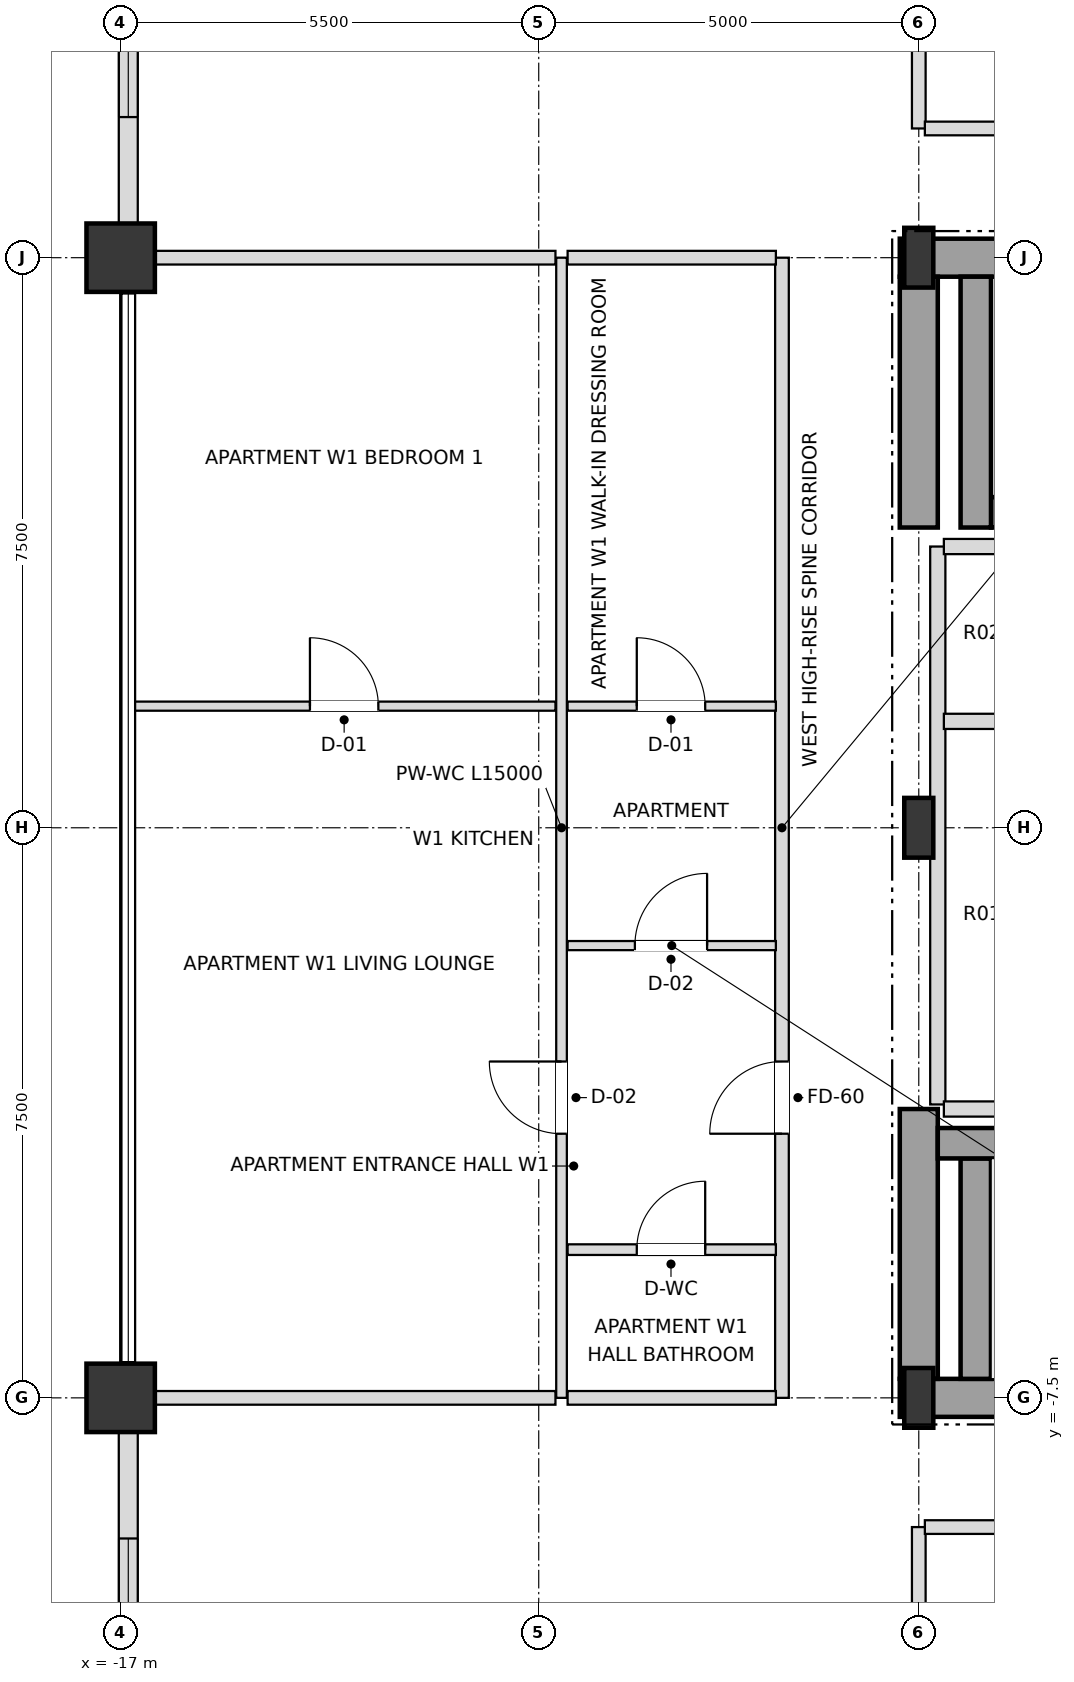
"""IFC4 building model, lengths in metres.
Left out: names, types, materials, properties, quantities, classifications, styles, units other than length and angle.
Written with IfcOpenShell. Run it as: python <this file> out.ifc"""

import sys

from ifc_helpers import new_model, si_unit, direction, frame, frame_2d, origin, origin_2d, place, context, subcontext, project, spatial, rectangle, i_section, extrude, element, fill, save


model = new_model("IFC4")
c1 = context("Model", 3, precision=1e-05, world=origin(), true_north=direction((0.0, 1.0)))
c2 = subcontext(c1, "Body", "Model", "MODEL_VIEW")
j1 = project(units=[si_unit("LENGTHUNIT", "METRE"), si_unit("PLANEANGLEUNIT", "RADIAN")], contexts=[c1])
p1 = place(None, origin())
s1 = spatial("IfcSite", under=j1, at=p1, CompositionType="ELEMENT")
p2 = place(p1, origin())
s2 = spatial("IfcBuilding", under=s1, at=p2, CompositionType="ELEMENT")
p3 = place(p2, frame((0.0, 0.0, 290.7)))
s3 = spatial("IfcBuildingStorey", under=s2, at=p3, CompositionType="ELEMENT", Elevation=290.7)
for number, where, z_axis, x_axis in (
    (1, (-6.5, -7.5, 0.0), (0.0, 0.0, 1.0), (1.0, 0.0, 0.0)),
    (2, (-6.5, 0.0, 0.0), (0.0, 0.0, 1.0), (1.0, 0.0, 0.0)),
    (3, (-6.5, 7.5, 0.0), (0.0, 0.0, 1.0), (1.0, 0.0, 0.0)),
):
    element("IfcColumn", number, at=place(p3, frame(where, z_axis=z_axis, x_axis=x_axis)), inside=s3, PredefinedType="COLUMN", context=c2, shape_type="SweptSolid", body=[
        extrude(i_section(OverallWidth=0.382, OverallDepth=0.786, WebThickness=0.02, FlangeThickness=0.033, at=origin_2d()), origin(), (0.0, 0.0, 1.0), 3.6),
    ])
for number, where, z_axis, x_axis in (
    (4, (-17.0, 7.5, 0.0), (0.0, 0.0, 1.0), (1.0, 0.0, 0.0)),
    (5, (-17.0, -7.5, 0.0), (0.0, 0.0, 1.0), (1.0, 0.0, 0.0)),
):
    element("IfcColumn", number, at=place(p3, frame(where, z_axis=z_axis, x_axis=x_axis)), inside=s3, PredefinedType="USERDEFINED", context=c2, shape_type="SweptSolid", body=[
        extrude(rectangle(XDim=0.9, YDim=0.9, at=origin_2d()), origin(), (0.0, 0.0, 1.0), 3.6),
    ])
p4 = place(p3, frame((-16.9, 12.555, 0.0), z_axis=(0.0, 0.0, 1.0), x_axis=(0.0, -1.0, 0.0)))
e6 = element("IfcWall", 6, at=p4, inside=s3, PredefinedType="SOLIDWALL", context=c2, shape_type="SweptSolid", body=[
    extrude(rectangle(XDim=4.61, YDim=0.25, at=frame_2d((2.305, 0.0))), origin(), (0.0, 0.0, 1.0), 2.748),
])
p5 = place(p4, frame((1.405, 0.0, 0.72)))
e7 = element("IfcOpeningElement", 7, at=p5, cuts=e6, PredefinedType="OPENING", context=c2, shape_type="SweptSolid", body=[
    extrude(rectangle(XDim=1.8, YDim=1.68, at=frame_2d((0.9, 0.84))), frame((0.0, 0.135, 0.0), z_axis=(0.0, -1.0, 0.0), x_axis=(1.0, 0.0, 0.0)), (0.0, 0.0, 1.0), 0.27),
])
p6 = place(p3, frame((-16.9, -7.945, 0.0), z_axis=(0.0, 0.0, 1.0), x_axis=(0.0, -1.0, 0.0)))
e8 = element("IfcWall", 8, at=p6, inside=s3, PredefinedType="SOLIDWALL", context=c2, shape_type="SweptSolid", body=[
    extrude(rectangle(XDim=4.61, YDim=0.25, at=frame_2d((2.305, 0.0))), origin(), (0.0, 0.0, 1.0), 2.748),
])
p7 = place(p6, frame((1.405, 0.0, 0.72)))
e9 = element("IfcOpeningElement", 9, at=p7, cuts=e8, PredefinedType="OPENING", context=c2, shape_type="SweptSolid", body=[
    extrude(rectangle(XDim=1.8, YDim=1.68, at=frame_2d((0.9, 0.84))), frame((0.0, 0.135, 0.0), z_axis=(0.0, -1.0, 0.0), x_axis=(1.0, 0.0, 0.0)), (0.0, 0.0, 1.0), 0.27),
])
p8 = place(p3, frame((-6.75, -7.5, 0.0), z_axis=(0.0, 0.0, 1.0), x_axis=(1.0, 0.0, 0.0)))
e10 = element("IfcWall", 10, at=p8, inside=s3, PredefinedType="SHEAR", context=c2, shape_type="SweptSolid", body=[
    extrude(rectangle(XDim=6.75, YDim=0.5, at=frame_2d((3.375, 0.0))), origin(), (0.0, 0.0, 1.0), 3.38),
])
p9 = place(p3, frame((-6.75, 7.5, 0.0), z_axis=(0.0, 0.0, 1.0), x_axis=(1.0, 0.0, 0.0)))
e11 = element("IfcWall", 11, at=p9, inside=s3, PredefinedType="SHEAR", context=c2, shape_type="SweptSolid", body=[
    extrude(rectangle(XDim=6.75, YDim=0.5, at=frame_2d((3.375, 0.0))), origin(), (0.0, 0.0, 1.0), 3.38),
])
p10 = place(p9, frame((1.65, 0.0, 0.0)))
e12 = element("IfcOpeningElement", 12, at=p10, cuts=e11, PredefinedType="OPENING", context=c2, shape_type="SweptSolid", body=[
    extrude(rectangle(XDim=1.05, YDim=2.15, at=frame_2d((0.525, 1.075))), frame((0.0, 0.26, 0.0), z_axis=(0.0, -1.0, 0.0), x_axis=(1.0, 0.0, 0.0)), (0.0, 0.0, 1.0), 0.52),
])
p11 = place(p3, frame((-6.5, -7.25, 0.0), z_axis=(0.0, 0.0, 1.0), x_axis=(0.0, 1.0, 0.0)))
e13 = element("IfcWall", 13, at=p11, inside=s3, PredefinedType="SHEAR", context=c2, shape_type="SweptSolid", body=[
    extrude(rectangle(XDim=3.55, YDim=0.5, at=frame_2d((1.775, 0.0))), origin(), (0.0, 0.0, 1.0), 3.38),
])
p12 = place(p3, frame((-6.5, 3.95, 0.0), z_axis=(0.0, 0.0, 1.0), x_axis=(0.0, 1.0, 0.0)))
e14 = element("IfcWall", 14, at=p12, inside=s3, PredefinedType="SHEAR", context=c2, shape_type="SweptSolid", body=[
    extrude(rectangle(XDim=3.3, YDim=0.5, at=frame_2d((1.65, 0.0))), origin(), (0.0, 0.0, 1.0), 3.38),
])
p13 = place(p3, frame((-5.75, -7.25, 0.0), z_axis=(0.0, 0.0, 1.0), x_axis=(0.0, 1.0, 0.0)))
e15 = element("IfcWall", 15, at=p13, inside=s3, PredefinedType="SHEAR", context=c2, shape_type="SweptSolid", body=[
    extrude(rectangle(XDim=2.9, YDim=0.4, at=frame_2d((1.45, 0.0))), origin(), (0.0, 0.0, 1.0), 3.38),
])
p14 = place(p3, frame((-6.25, -4.15, 0.0), z_axis=(0.0, 0.0, 1.0), x_axis=(1.0, 0.0, 0.0)))
e16 = element("IfcWall", 16, at=p14, inside=s3, PredefinedType="SHEAR", context=c2, shape_type="SweptSolid", body=[
    extrude(rectangle(XDim=7.78, YDim=0.4, at=frame_2d((3.89, 0.0))), origin(), (0.0, 0.0, 1.0), 3.38),
])
p15 = place(p3, frame((-5.55, 4.15, 0.0), z_axis=(0.0, 0.0, 1.0), x_axis=(1.0, 0.0, 0.0)))
e17 = element("IfcWall", 17, at=p15, inside=s3, PredefinedType="SHEAR", context=c2, shape_type="SweptSolid", body=[
    extrude(rectangle(XDim=7.08, YDim=0.4, at=frame_2d((3.54, 0.0))), origin(), (0.0, 0.0, 1.0), 3.38),
])
p16 = place(p3, frame((-5.75, 3.95, 0.0), z_axis=(0.0, 0.0, 1.0), x_axis=(0.0, 1.0, 0.0)))
e18 = element("IfcWall", 18, at=p16, inside=s3, PredefinedType="SHEAR", context=c2, shape_type="SweptSolid", body=[
    extrude(rectangle(XDim=3.3, YDim=0.4, at=frame_2d((1.65, 0.0))), origin(), (0.0, 0.0, 1.0), 3.38),
])
p17 = place(p3, frame((-11.2, -7.5, 0.0), z_axis=(0.0, 0.0, 1.0), x_axis=(0.0, 1.0, 0.0)))
e19 = element("IfcWall", 19, at=p17, inside=s3, PredefinedType="PARTITIONING", context=c2, shape_type="SweptSolid", body=[
    extrude(rectangle(XDim=15.0, YDim=0.14, at=frame_2d((7.5, 0.0))), origin(), (0.0, 0.0, 1.0), 3.38),
])
p18 = place(p17, frame((3.475, 0.0, 0.0)))
e20 = element("IfcOpeningElement", 20, at=p18, cuts=e19, PredefinedType="OPENING", context=c2, shape_type="SweptSolid", body=[
    extrude(rectangle(XDim=0.95, YDim=2.1, at=frame_2d((0.475, 1.05))), frame((0.0, 0.08, 0.0), z_axis=(0.0, -1.0, 0.0), x_axis=(1.0, 0.0, 0.0)), (0.0, 0.0, 1.0), 0.16),
])
p19 = place(p3, frame((-8.3, -7.5, 0.0), z_axis=(0.0, 0.0, 1.0), x_axis=(0.0, 1.0, 0.0)))
e21 = element("IfcWall", 21, at=p19, inside=s3, PredefinedType="PARTITIONING", context=c2, shape_type="SweptSolid", body=[
    extrude(rectangle(XDim=15.0, YDim=0.18, at=frame_2d((7.5, 0.0))), origin(), (0.0, 0.0, 1.0), 3.38),
])
p20 = place(p19, frame((3.475, 0.0, 0.0)))
e22 = element("IfcOpeningElement", 22, at=p20, cuts=e21, PredefinedType="OPENING", context=c2, shape_type="SweptSolid", body=[
    extrude(rectangle(XDim=0.95, YDim=2.15, at=frame_2d((0.475, 1.075))), frame((0.0, 0.1, 0.0), z_axis=(0.0, -1.0, 0.0), x_axis=(1.0, 0.0, 0.0)), (0.0, 0.0, 1.0), 0.2),
])
for number, where, z_axis, x_axis in (
    (23, (-6.5, -19.9, 0.0), (0.0, 0.0, 1.0), (0.0, 1.0, 0.0)),
    (24, (-6.5, 9.2, 0.0), (0.0, 0.0, 1.0), (0.0, 1.0, 0.0)),
):
    element("IfcWall", number, at=place(p3, frame(where, z_axis=z_axis, x_axis=x_axis)), inside=s3, PredefinedType="PARTITIONING", context=c2, shape_type="SweptSolid", body=[
        extrude(rectangle(XDim=10.7, YDim=0.18, at=frame_2d((5.35, 0.0))), origin(), (0.0, 0.0, 1.0), 2.826),
    ])
p21 = place(p3, frame((-6.25, -3.64, 0.0), z_axis=(0.0, 0.0, 1.0), x_axis=(0.0, 1.0, 0.0)))
e25 = element("IfcWall", 25, at=p21, inside=s3, PredefinedType="SOLIDWALL", context=c2, shape_type="SweptSolid", body=[
    extrude(rectangle(XDim=7.34, YDim=0.2, at=frame_2d((3.67, 0.0))), origin(), (0.0, 0.0, 1.0), 3.38),
])
p22 = place(p3, frame((-6.42, -9.2, 0.0), z_axis=(0.0, 0.0, 1.0), x_axis=(1.0, 0.0, 0.0)))
e26 = element("IfcWall", 26, at=p22, inside=s3, PredefinedType="PARTITIONING", context=c2, shape_type="SweptSolid", body=[
    extrude(rectangle(XDim=5.19, YDim=0.18, at=frame_2d((2.595, 0.0))), origin(), (0.0, 0.0, 1.0), 3.38),
])
p23 = place(p22, frame((2.135, 0.0, 0.0)))
e27 = element("IfcOpeningElement", 27, at=p23, cuts=e26, PredefinedType="OPENING", context=c2, shape_type="SweptSolid", body=[
    extrude(rectangle(XDim=0.95, YDim=2.15, at=frame_2d((0.475, 1.075))), frame((0.0, 0.1, 0.0), z_axis=(0.0, -1.0, 0.0), x_axis=(1.0, 0.0, 0.0)), (0.0, 0.0, 1.0), 0.2),
])
p24 = place(p3, frame((-16.9, -7.5, 0.0), z_axis=(0.0, 0.0, 1.0), x_axis=(1.0, 0.0, 0.0)))
e28 = element("IfcWall", 28, at=p24, inside=s3, PredefinedType="PARTITIONING", context=c2, shape_type="SweptSolid", body=[
    extrude(rectangle(XDim=5.62, YDim=0.18, at=frame_2d((2.81, 0.0))), origin(), (0.0, 0.0, 1.0), 2.826),
])
p25 = place(p3, frame((-11.12, -7.5, 0.0), z_axis=(0.0, 0.0, 1.0), x_axis=(1.0, 0.0, 0.0)))
e29 = element("IfcWall", 29, at=p25, inside=s3, PredefinedType="PARTITIONING", context=c2, shape_type="SweptSolid", body=[
    extrude(rectangle(XDim=2.74, YDim=0.18, at=frame_2d((1.37, 0.0))), origin(), (0.0, 0.0, 1.0), 2.826),
])
p26 = place(p3, frame((-11.12, -5.55, 0.0), z_axis=(0.0, 0.0, 1.0), x_axis=(1.0, 0.0, 0.0)))
e30 = element("IfcWall", 30, at=p26, inside=s3, PredefinedType="PARTITIONING", context=c2, shape_type="SweptSolid", body=[
    extrude(rectangle(XDim=2.74, YDim=0.14, at=frame_2d((1.37, 0.0))), origin(), (0.0, 0.0, 1.0), 3.38),
])
p27 = place(p26, frame((0.91, 0.0, 0.0)))
e31 = element("IfcOpeningElement", 31, at=p27, cuts=e30, PredefinedType="OPENING", context=c2, shape_type="SweptSolid", body=[
    extrude(rectangle(XDim=0.9, YDim=2.1, at=frame_2d((0.45, 1.05))), frame((0.0, 0.08, 0.0), z_axis=(0.0, -1.0, 0.0), x_axis=(1.0, 0.0, 0.0)), (0.0, 0.0, 1.0), 0.16),
])
p28 = place(p3, frame((-6.17, -3.7, 0.0), z_axis=(0.0, 0.0, 1.0), x_axis=(1.0, 0.0, 0.0)))
e32 = element("IfcWall", 32, at=p28, inside=s3, PredefinedType="SOLIDWALL", context=c2, shape_type="SweptSolid", body=[
    extrude(rectangle(XDim=1.94, YDim=0.2, at=frame_2d((0.97, 0.0))), origin(), (0.0, 0.0, 1.0), 3.38),
])
p29 = place(p3, frame((-11.12, -1.55, 0.0), z_axis=(0.0, 0.0, 1.0), x_axis=(1.0, 0.0, 0.0)))
e33 = element("IfcWall", 33, at=p29, inside=s3, PredefinedType="PARTITIONING", context=c2, shape_type="SweptSolid", body=[
    extrude(rectangle(XDim=2.74, YDim=0.12, at=frame_2d((1.37, 0.0))), origin(), (0.0, 0.0, 1.0), 3.38),
])
p30 = place(p29, frame((0.885, 0.0, 0.0)))
e34 = element("IfcOpeningElement", 34, at=p30, cuts=e33, PredefinedType="OPENING", context=c2, shape_type="SweptSolid", body=[
    extrude(rectangle(XDim=0.95, YDim=2.1, at=frame_2d((0.475, 1.05))), frame((0.0, 0.07, 0.0), z_axis=(0.0, -1.0, 0.0), x_axis=(1.0, 0.0, 0.0)), (0.0, 0.0, 1.0), 0.14),
])
p31 = place(p3, frame((-6.17, 1.4, 0.0), z_axis=(0.0, 0.0, 1.0), x_axis=(1.0, 0.0, 0.0)))
e35 = element("IfcWall", 35, at=p31, inside=s3, PredefinedType="SOLIDWALL", context=c2, shape_type="SweptSolid", body=[
    extrude(rectangle(XDim=1.94, YDim=0.2, at=frame_2d((0.97, 0.0))), origin(), (0.0, 0.0, 1.0), 3.38),
])
p32 = place(p3, frame((-16.82, 1.6, 0.0), z_axis=(0.0, 0.0, 1.0), x_axis=(1.0, 0.0, 0.0)))
e36 = element("IfcWall", 36, at=p32, inside=s3, PredefinedType="PARTITIONING", context=c2, shape_type="SweptSolid", body=[
    extrude(rectangle(XDim=5.54, YDim=0.12, at=frame_2d((2.77, 0.0))), origin(), (0.0, 0.0, 1.0), 3.018),
])
p33 = place(p32, frame((2.31, 0.0, 0.0)))
e37 = element("IfcOpeningElement", 37, at=p33, cuts=e36, PredefinedType="OPENING", context=c2, shape_type="SweptSolid", body=[
    extrude(rectangle(XDim=0.9, YDim=2.1, at=frame_2d((0.45, 1.05))), frame((0.0, 0.07, 0.0), z_axis=(0.0, -1.0, 0.0), x_axis=(1.0, 0.0, 0.0)), (0.0, 0.0, 1.0), 0.14),
])
p34 = place(p3, frame((-11.12, 1.6, 0.0), z_axis=(0.0, 0.0, 1.0), x_axis=(1.0, 0.0, 0.0)))
e38 = element("IfcWall", 38, at=p34, inside=s3, PredefinedType="PARTITIONING", context=c2, shape_type="SweptSolid", body=[
    extrude(rectangle(XDim=2.74, YDim=0.12, at=frame_2d((1.37, 0.0))), origin(), (0.0, 0.0, 1.0), 3.38),
])
p35 = place(p34, frame((0.91, 0.0, 0.0)))
e39 = element("IfcOpeningElement", 39, at=p35, cuts=e38, PredefinedType="OPENING", context=c2, shape_type="SweptSolid", body=[
    extrude(rectangle(XDim=0.9, YDim=2.1, at=frame_2d((0.45, 1.05))), frame((0.0, 0.07, 0.0), z_axis=(0.0, -1.0, 0.0), x_axis=(1.0, 0.0, 0.0)), (0.0, 0.0, 1.0), 0.14),
])
p36 = place(p3, frame((-6.17, 3.7, 0.0), z_axis=(0.0, 0.0, 1.0), x_axis=(1.0, 0.0, 0.0)))
e40 = element("IfcWall", 40, at=p36, inside=s3, PredefinedType="SOLIDWALL", context=c2, shape_type="SweptSolid", body=[
    extrude(rectangle(XDim=1.94, YDim=0.2, at=frame_2d((0.97, 0.0))), origin(), (0.0, 0.0, 1.0), 3.38),
])
p37 = place(p3, frame((-16.9, 7.5, 0.0), z_axis=(0.0, 0.0, 1.0), x_axis=(1.0, 0.0, 0.0)))
e41 = element("IfcWall", 41, at=p37, inside=s3, PredefinedType="PARTITIONING", context=c2, shape_type="SweptSolid", body=[
    extrude(rectangle(XDim=5.62, YDim=0.18, at=frame_2d((2.81, 0.0))), origin(), (0.0, 0.0, 1.0), 2.826),
])
p38 = place(p3, frame((-11.12, 7.5, 0.0), z_axis=(0.0, 0.0, 1.0), x_axis=(1.0, 0.0, 0.0)))
e42 = element("IfcWall", 42, at=p38, inside=s3, PredefinedType="PARTITIONING", context=c2, shape_type="SweptSolid", body=[
    extrude(rectangle(XDim=2.74, YDim=0.18, at=frame_2d((1.37, 0.0))), origin(), (0.0, 0.0, 1.0), 2.826),
])
p39 = place(p3, frame((-6.42, 9.2, 0.0), z_axis=(0.0, 0.0, 1.0), x_axis=(1.0, 0.0, 0.0)))
e43 = element("IfcWall", 43, at=p39, inside=s3, PredefinedType="PARTITIONING", context=c2, shape_type="SweptSolid", body=[
    extrude(rectangle(XDim=5.19, YDim=0.18, at=frame_2d((2.595, 0.0))), origin(), (0.0, 0.0, 1.0), 3.38),
])
p40 = place(p39, frame((2.135, 0.0, 0.0)))
e44 = element("IfcOpeningElement", 44, at=p40, cuts=e43, PredefinedType="OPENING", context=c2, shape_type="SweptSolid", body=[
    extrude(rectangle(XDim=0.95, YDim=2.15, at=frame_2d((0.475, 1.075))), frame((0.0, 0.1, 0.0), z_axis=(0.0, -1.0, 0.0), x_axis=(1.0, 0.0, 0.0)), (0.0, 0.0, 1.0), 0.2),
])
p41 = place(p5, origin())
e45 = element("IfcWindow", 45, at=p41, inside=s3, PartitioningType="SINGLE_PANEL", PredefinedType="WINDOW", context=c2, shape_type="SweptSolid", body=[
    extrude(rectangle(XDim=1.8, YDim=1.68, at=frame_2d((0.9, 0.84))), frame((0.0, 0.03, 0.0), z_axis=(0.0, -1.0, 0.0), x_axis=(1.0, 0.0, 0.0)), (0.0, 0.0, 1.0), 0.06),
])
fill(e7, e45)
p42 = place(p7, origin())
e46 = element("IfcWindow", 46, at=p42, inside=s3, PartitioningType="SINGLE_PANEL", PredefinedType="WINDOW", context=c2, shape_type="SweptSolid", body=[
    extrude(rectangle(XDim=1.8, YDim=1.68, at=frame_2d((0.9, 0.84))), frame((0.0, 0.03, 0.0), z_axis=(0.0, -1.0, 0.0), x_axis=(1.0, 0.0, 0.0)), (0.0, 0.0, 1.0), 0.06),
])
fill(e9, e46)
p43 = place(p27, origin())
e47 = element("IfcDoor", 47, at=p43, inside=s3, OperationType="SINGLE_SWING_RIGHT", PredefinedType="DOOR", context=c2, shape_type="SweptSolid", body=[
    extrude(rectangle(XDim=0.9, YDim=2.1, at=frame_2d((0.45, 1.05))), frame((0.0, 0.025, 0.0), z_axis=(0.0, -1.0, 0.0), x_axis=(1.0, 0.0, 0.0)), (0.0, 0.0, 1.0), 0.05),
])
fill(e31, e47)
p44 = place(p20, origin())
e48 = element("IfcDoor", 48, at=p44, inside=s3, OperationType="SINGLE_SWING_LEFT", PredefinedType="DOOR", context=c2, shape_type="SweptSolid", body=[
    extrude(rectangle(XDim=0.95, YDim=2.15, at=frame_2d((0.475, 1.075))), frame((0.0, 0.025, 0.0), z_axis=(0.0, -1.0, 0.0), x_axis=(1.0, 0.0, 0.0)), (0.0, 0.0, 1.0), 0.05),
])
fill(e22, e48)
p45 = place(p30, origin())
e49 = element("IfcDoor", 49, at=p45, inside=s3, OperationType="SINGLE_SWING_RIGHT", PredefinedType="DOOR", context=c2, shape_type="SweptSolid", body=[
    extrude(rectangle(XDim=0.95, YDim=2.1, at=frame_2d((0.475, 1.05))), frame((0.0, 0.025, 0.0), z_axis=(0.0, -1.0, 0.0), x_axis=(1.0, 0.0, 0.0)), (0.0, 0.0, 1.0), 0.05),
])
fill(e34, e49)
p46 = place(p35, origin())
e50 = element("IfcDoor", 50, at=p46, inside=s3, OperationType="SINGLE_SWING_LEFT", PredefinedType="DOOR", context=c2, shape_type="SweptSolid", body=[
    extrude(rectangle(XDim=0.9, YDim=2.1, at=frame_2d((0.45, 1.05))), frame((0.0, 0.025, 0.0), z_axis=(0.0, -1.0, 0.0), x_axis=(1.0, 0.0, 0.0)), (0.0, 0.0, 1.0), 0.05),
])
fill(e39, e50)
p47 = place(p18, origin())
e51 = element("IfcDoor", 51, at=p47, inside=s3, OperationType="SINGLE_SWING_RIGHT", PredefinedType="DOOR", context=c2, shape_type="SweptSolid", body=[
    extrude(rectangle(XDim=0.95, YDim=2.1, at=frame_2d((0.475, 1.05))), frame((0.0, 0.025, 0.0), z_axis=(0.0, -1.0, 0.0), x_axis=(1.0, 0.0, 0.0)), (0.0, 0.0, 1.0), 0.05),
])
fill(e20, e51)
p48 = place(p33, origin())
e52 = element("IfcDoor", 52, at=p48, inside=s3, OperationType="SINGLE_SWING_LEFT", PredefinedType="DOOR", context=c2, shape_type="SweptSolid", body=[
    extrude(rectangle(XDim=0.9, YDim=2.1, at=frame_2d((0.45, 1.05))), frame((0.0, 0.025, 0.0), z_axis=(0.0, -1.0, 0.0), x_axis=(1.0, 0.0, 0.0)), (0.0, 0.0, 1.0), 0.05),
])
fill(e37, e52)
save(model, sys.argv[1])
